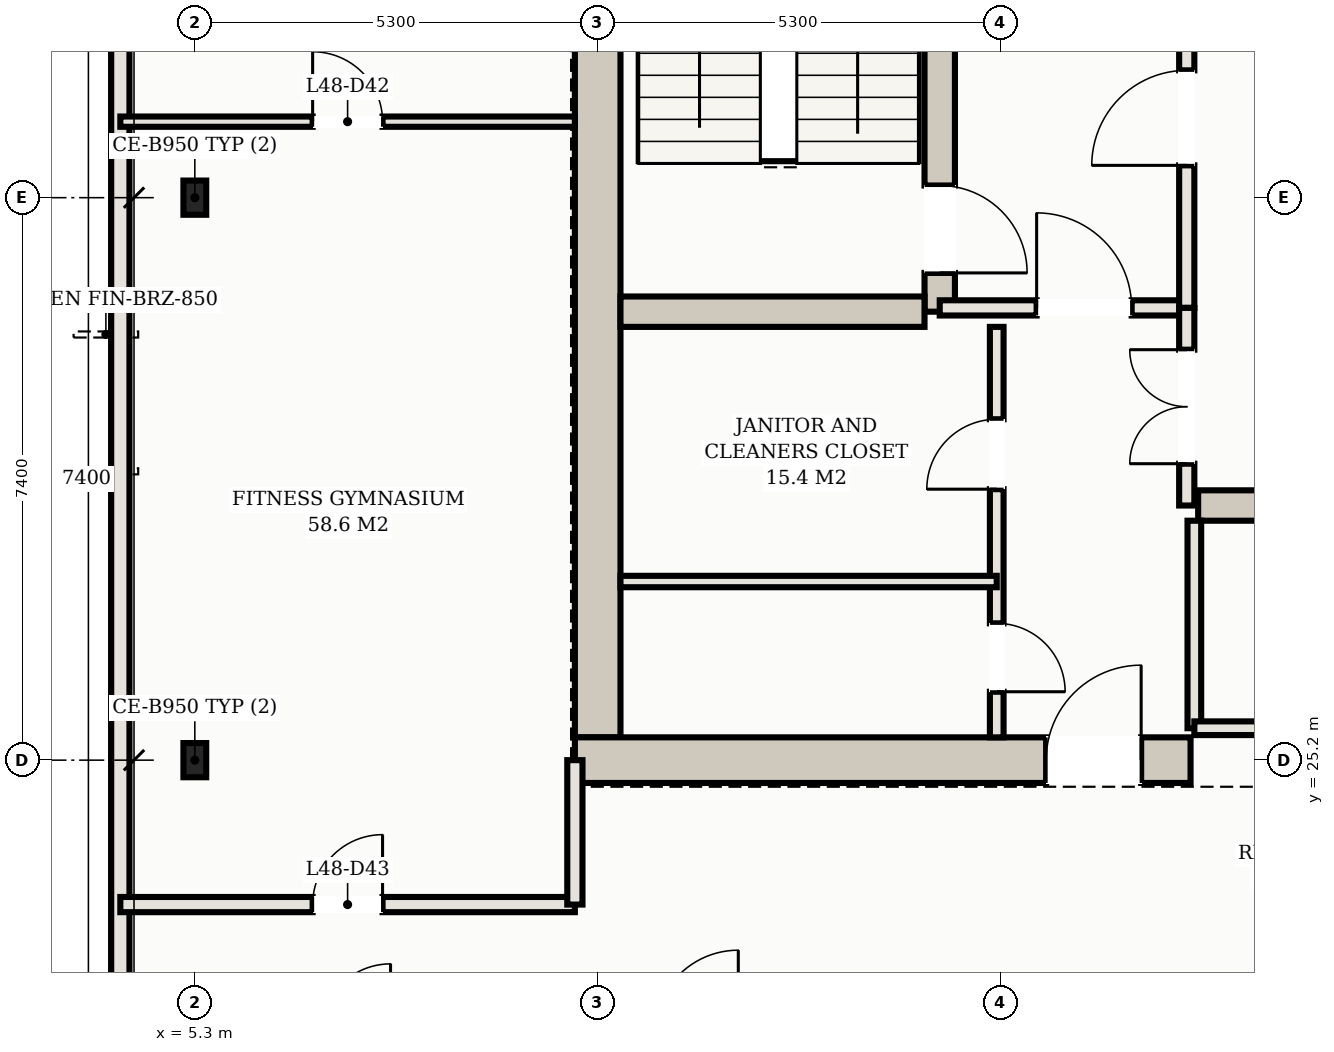
"""IFC4 building model, lengths in metres.
Left out: names, types, materials, properties, quantities, classifications, styles, units other than length and angle.
Written with IfcOpenShell. Run it as: python <this file> out.ifc"""

import sys

from ifc_helpers import new_model, si_unit, direction, frame, frame_2d, origin, origin_2d, place, context, subcontext, project, spatial, rectangle, hollow_rectangle, extrude, element, fill, save


model = new_model("IFC4")
c1 = context("Model", 3, precision=1e-05, world=origin(), true_north=direction((0.0, 1.0)))
c2 = subcontext(c1, "Body", "Model", "MODEL_VIEW")
j1 = project(units=[si_unit("LENGTHUNIT", "METRE"), si_unit("PLANEANGLEUNIT", "RADIAN")], contexts=[c1])
p1 = place(None, origin())
s1 = spatial("IfcSite", under=j1, at=p1, CompositionType="ELEMENT")
p2 = place(p1, origin())
s2 = spatial("IfcBuilding", under=s1, at=p2, CompositionType="ELEMENT")
p3 = place(p2, frame((0.0, 0.0, 175.5)))
s3 = spatial("IfcBuildingStorey", under=s2, at=p3, CompositionType="ELEMENT", Elevation=175.5)
p4 = place(p3, frame((10.6, 25.5, 0.0), z_axis=(0.0, 0.0, 1.0), x_axis=(0.0, 1.0, 0.0)))
e1 = element("IfcWall", 1, at=p4, inside=s3, PredefinedType="SHEAR", context=c2, shape_type="SweptSolid", body=[
    extrude(rectangle(XDim=14.2, YDim=0.6, at=frame_2d((7.1, 0.0))), origin(), (0.0, 0.0, 1.0), 3.1),
])
p5 = place(p3, frame((10.3, 25.2, 0.0), z_axis=(0.0, 0.0, 1.0), x_axis=(1.0, 0.0, 0.0)))
e2 = element("IfcWall", 2, at=p5, inside=s3, PredefinedType="SHEAR", context=c2, shape_type="SweptSolid", body=[
    extrude(rectangle(XDim=8.1, YDim=0.6, at=frame_2d((4.05, 0.0))), origin(), (0.0, 0.0, 1.0), 3.1),
])
p6 = place(p5, frame((6.2, 0.0, 0.0)))
e3 = element("IfcOpeningElement", 3, at=p6, cuts=e2, PredefinedType="OPENING", context=c2, shape_type="SweptSolid", body=[
    extrude(rectangle(XDim=1.25, YDim=2.2, at=frame_2d((0.625, 1.1))), frame((0.0, 0.31, 0.0), z_axis=(0.0, -1.0, 0.0), x_axis=(1.0, 0.0, 0.0)), (0.0, 0.0, 1.0), 0.62),
])
p7 = place(p3, frame((15.1, 31.1, 0.0), z_axis=(0.0, 0.0, 1.0), x_axis=(0.0, 1.0, 0.0)))
e4 = element("IfcWall", 4, at=p7, inside=s3, PredefinedType="SHEAR", context=c2, shape_type="SweptSolid", body=[
    extrude(rectangle(XDim=8.6, YDim=0.4, at=frame_2d((4.3, 0.0))), origin(), (0.0, 0.0, 1.0), 3.1),
])
p8 = place(p7, frame((0.51, 0.0, 0.0)))
e5 = element("IfcOpeningElement", 5, at=p8, cuts=e4, PredefinedType="OPENING", context=c2, shape_type="SweptSolid", body=[
    extrude(rectangle(XDim=1.15, YDim=2.2, at=frame_2d((0.575, 1.1))), frame((0.0, 0.21, 0.0), z_axis=(0.0, -1.0, 0.0), x_axis=(1.0, 0.0, 0.0)), (0.0, 0.0, 1.0), 0.42),
])
p9 = place(p3, frame((10.9, 31.1, 0.0), z_axis=(0.0, 0.0, 1.0), x_axis=(1.0, 0.0, 0.0)))
e6 = element("IfcWall", 6, at=p9, inside=s3, PredefinedType="SHEAR", context=c2, shape_type="SweptSolid", body=[
    extrude(rectangle(XDim=4.0, YDim=0.4, at=frame_2d((2.0, 0.0))), origin(), (0.0, 0.0, 1.0), 3.1),
])
p10 = place(p3, frame((18.5, 28.55, 0.0), z_axis=(0.0, 0.0, 1.0), x_axis=(1.0, 0.0, 0.0)))
e7 = element("IfcWall", 7, at=p10, inside=s3, PredefinedType="SHEAR", context=c2, shape_type="SweptSolid", body=[
    extrude(rectangle(XDim=16.0, YDim=0.4, at=frame_2d((8.0, 0.0))), origin(), (0.0, 0.0, 1.0), 3.1),
])
p11 = place(p10, frame((8.95, 0.0, 0.0)))
e8 = element("IfcOpeningElement", 8, at=p11, cuts=e7, PredefinedType="OPENING", context=c2, shape_type="SweptSolid", body=[
    extrude(rectangle(XDim=1.1, YDim=2.15, at=frame_2d((0.55, 1.075))), frame((0.0, 0.21, 0.0), z_axis=(0.0, -1.0, 0.0), x_axis=(1.0, 0.0, 0.0)), (0.0, 0.0, 1.0), 0.42),
])
p12 = place(p10, frame((11.55, 0.0, 0.0)))
e9 = element("IfcOpeningElement", 9, at=p12, cuts=e7, PredefinedType="OPENING", context=c2, shape_type="SweptSolid", body=[
    extrude(rectangle(XDim=1.1, YDim=2.15, at=frame_2d((0.55, 1.075))), frame((0.0, 0.21, 0.0), z_axis=(0.0, -1.0, 0.0), x_axis=(1.0, 0.0, 0.0)), (0.0, 0.0, 1.0), 0.42),
])
p13 = place(p10, frame((14.15, 0.0, 0.0)))
e10 = element("IfcOpeningElement", 10, at=p13, cuts=e7, PredefinedType="OPENING", context=c2, shape_type="SweptSolid", body=[
    extrude(rectangle(XDim=1.1, YDim=2.15, at=frame_2d((0.55, 1.075))), frame((0.0, 0.21, 0.0), z_axis=(0.0, -1.0, 0.0), x_axis=(1.0, 0.0, 0.0)), (0.0, 0.0, 1.0), 0.42),
])
for number, where, z_axis, x_axis in (
    (11, (5.3, 25.2, 0.0), (0.0, 0.0, 1.0), (1.0, 0.0, 0.0)),
    (12, (5.3, 32.6, 0.0), (0.0, 0.0, 1.0), (1.0, 0.0, 0.0)),
):
    element("IfcColumn", number, at=place(p3, frame(where, z_axis=z_axis, x_axis=x_axis)), inside=s3, PredefinedType="COLUMN", context=c2, shape_type="SweptSolid", body=[
        extrude(hollow_rectangle(XDim=0.3, YDim=0.45, WallThickness=0.016, at=origin_2d()), origin(), (0.0, 0.0, 1.0), 3.3),
    ])
p14 = place(p3, frame((4.32, 35.93, 0.0), z_axis=(0.0, 0.0, 1.0), x_axis=(0.0, -1.0, 0.0)))
e13 = element("IfcWall", 13, at=p14, inside=s3, PredefinedType="SOLIDWALL", context=c2, shape_type="SweptSolid", body=[
    extrude(rectangle(XDim=27.41, YDim=0.24, at=frame_2d((13.705, 0.0))), origin(), (0.0, 0.0, 1.0), 3.1),
])
p15 = place(p14, frame((17.13, 0.0, 0.0)))
e14 = element("IfcOpeningElement", 14, at=p15, cuts=e13, PredefinedType="OPENING", context=c2, shape_type="SweptSolid", body=[
    extrude(rectangle(XDim=1.8, YDim=2.2, at=frame_2d((0.9, 1.1))), frame((0.0, 0.13, 0.0), z_axis=(0.0, -1.0, 0.0), x_axis=(1.0, 0.0, 0.0)), (0.0, 0.0, 1.0), 0.26),
])
p16 = place(p3, frame((15.1, 31.15, 0.0), z_axis=(0.0, 0.0, 1.0), x_axis=(1.0, 0.0, 0.0)))
e15 = element("IfcWall", 15, at=p16, inside=s3, PredefinedType="PARTITIONING", context=c2, shape_type="SweptSolid", body=[
    extrude(rectangle(XDim=3.25, YDim=0.2, at=frame_2d((1.625, 0.0))), origin(), (0.0, 0.0, 1.0), 2.38),
])
p17 = place(p16, frame((1.275, 0.0, 0.0)))
e16 = element("IfcOpeningElement", 16, at=p17, cuts=e15, PredefinedType="OPENING", context=c2, shape_type="SweptSolid", body=[
    extrude(rectangle(XDim=1.25, YDim=2.2, at=frame_2d((0.625, 1.1))), frame((0.0, 0.11, 0.0), z_axis=(0.0, -1.0, 0.0), x_axis=(1.0, 0.0, 0.0)), (0.0, 0.0, 1.0), 0.22),
])
p18 = place(p3, frame((18.35, 31.15, 0.0), z_axis=(0.0, 0.0, 1.0), x_axis=(0.0, 1.0, 0.0)))
e17 = element("IfcWall", 17, at=p18, inside=s3, PredefinedType="PARTITIONING", context=c2, shape_type="SweptSolid", body=[
    extrude(rectangle(XDim=5.15, YDim=0.2, at=frame_2d((2.575, 0.0))), origin(), (0.0, 0.0, 1.0), 2.38),
])
p19 = place(p18, frame((1.875, 0.0, 0.0)))
e18 = element("IfcOpeningElement", 18, at=p19, cuts=e17, PredefinedType="OPENING", context=c2, shape_type="SweptSolid", body=[
    extrude(rectangle(XDim=1.25, YDim=2.2, at=frame_2d((0.625, 1.1))), frame((0.0, 0.11, 0.0), z_axis=(0.0, -1.0, 0.0), x_axis=(1.0, 0.0, 0.0)), (0.0, 0.0, 1.0), 0.22),
])
p20 = place(p3, frame((15.85, 25.5, 0.0), z_axis=(0.0, 0.0, 1.0), x_axis=(0.0, 1.0, 0.0)))
e19 = element("IfcWall", 19, at=p20, inside=s3, PredefinedType="PARTITIONING", context=c2, shape_type="SweptSolid", body=[
    extrude(rectangle(XDim=5.4, YDim=0.18, at=frame_2d((2.7, 0.0))), origin(), (0.0, 0.0, 1.0), 2.38),
])
p21 = place(p20, frame((0.6, 0.0, 0.0)))
e20 = element("IfcOpeningElement", 20, at=p21, cuts=e19, PredefinedType="OPENING", context=c2, shape_type="SweptSolid", body=[
    extrude(rectangle(XDim=0.9, YDim=2.15, at=frame_2d((0.45, 1.075))), frame((0.0, 0.1, 0.0), z_axis=(0.0, -1.0, 0.0), x_axis=(1.0, 0.0, 0.0)), (0.0, 0.0, 1.0), 0.2),
])
p22 = place(p20, frame((3.265, 0.0, 0.0)))
e21 = element("IfcOpeningElement", 21, at=p22, cuts=e19, PredefinedType="OPENING", context=c2, shape_type="SweptSolid", body=[
    extrude(rectangle(XDim=0.92, YDim=2.15, at=frame_2d((0.46, 1.075))), frame((0.0, 0.1, 0.0), z_axis=(0.0, -1.0, 0.0), x_axis=(1.0, 0.0, 0.0)), (0.0, 0.0, 1.0), 0.2),
])
p23 = place(p3, frame((10.9, 27.55, 0.0), z_axis=(0.0, 0.0, 1.0), x_axis=(1.0, 0.0, 0.0)))
e22 = element("IfcWall", 22, at=p23, inside=s3, PredefinedType="PARTITIONING", context=c2, shape_type="SweptSolid", body=[
    extrude(rectangle(XDim=4.95, YDim=0.15, at=frame_2d((2.475, 0.0))), origin(), (0.0, 0.0, 1.0), 2.38),
])
p24 = place(p3, frame((18.35, 28.55, 0.0), z_axis=(0.0, 0.0, 1.0), x_axis=(0.0, 1.0, 0.0)))
e23 = element("IfcWall", 23, at=p24, inside=s3, PredefinedType="PARTITIONING", context=c2, shape_type="SweptSolid", body=[
    extrude(rectangle(XDim=2.6, YDim=0.2, at=frame_2d((1.3, 0.0))), origin(), (0.0, 0.0, 1.0), 2.38),
])
p25 = place(p24, frame((0.55, 0.0, 0.0)))
e24 = element("IfcOpeningElement", 24, at=p25, cuts=e23, PredefinedType="OPENING", context=c2, shape_type="SweptSolid", body=[
    extrude(rectangle(XDim=1.5, YDim=2.25, at=frame_2d((0.75, 1.125))), frame((0.0, 0.11, 0.0), z_axis=(0.0, -1.0, 0.0), x_axis=(1.0, 0.0, 0.0)), (0.0, 0.0, 1.0), 0.22),
])
p26 = place(p3, frame((18.45, 25.62, 0.0), z_axis=(0.0, 0.0, 1.0), x_axis=(0.0, 1.0, 0.0)))
e25 = element("IfcWall", 25, at=p26, inside=s3, PredefinedType="PARTITIONING", context=c2, shape_type="SweptSolid", body=[
    extrude(rectangle(XDim=2.73, YDim=0.18, at=frame_2d((1.365, 0.0))), origin(), (0.0, 0.0, 1.0), 2.38),
])
p27 = place(p3, frame((18.45, 25.62, 0.0), z_axis=(0.0, 0.0, 1.0), x_axis=(1.0, 0.0, 0.0)))
e26 = element("IfcWall", 26, at=p27, inside=s3, PredefinedType="PARTITIONING", context=c2, shape_type="SweptSolid", body=[
    extrude(rectangle(XDim=7.9, YDim=0.18, at=frame_2d((3.95, 0.0))), origin(), (0.0, 0.0, 1.0), 2.38),
])
p28 = place(p27, frame((3.34, 0.0, 0.0)))
e27 = element("IfcOpeningElement", 27, at=p28, cuts=e26, PredefinedType="OPENING", context=c2, shape_type="SweptSolid", body=[
    extrude(rectangle(XDim=0.92, YDim=2.15, at=frame_2d((0.46, 1.075))), frame((0.0, 0.1, 0.0), z_axis=(0.0, -1.0, 0.0), x_axis=(1.0, 0.0, 0.0)), (0.0, 0.0, 1.0), 0.2),
])
p29 = place(p3, frame((4.32, 23.3, 0.0), z_axis=(0.0, 0.0, 1.0), x_axis=(1.0, 0.0, 0.0)))
e28 = element("IfcWall", 28, at=p29, inside=s3, PredefinedType="PARTITIONING", context=c2, shape_type="SweptSolid", body=[
    extrude(rectangle(XDim=5.98, YDim=0.2, at=frame_2d((2.99, 0.0))), origin(), (0.0, 0.0, 1.0), 2.38),
])
p30 = place(p29, frame((2.53, 0.0, 0.0)))
e29 = element("IfcOpeningElement", 29, at=p30, cuts=e28, PredefinedType="OPENING", context=c2, shape_type="SweptSolid", body=[
    extrude(rectangle(XDim=0.92, YDim=2.15, at=frame_2d((0.46, 1.075))), frame((0.0, 0.11, 0.0), z_axis=(0.0, -1.0, 0.0), x_axis=(1.0, 0.0, 0.0)), (0.0, 0.0, 1.0), 0.22),
])
p31 = place(p3, frame((10.3, 23.3, 0.0), z_axis=(0.0, 0.0, 1.0), x_axis=(0.0, 1.0, 0.0)))
e30 = element("IfcWall", 30, at=p31, inside=s3, PredefinedType="PARTITIONING", context=c2, shape_type="SweptSolid", body=[
    extrude(rectangle(XDim=1.9, YDim=0.2, at=frame_2d((0.95, 0.0))), origin(), (0.0, 0.0, 1.0), 2.38),
])
p32 = place(p3, frame((4.32, 33.6, 0.0), z_axis=(0.0, 0.0, 1.0), x_axis=(1.0, 0.0, 0.0)))
e31 = element("IfcWall", 31, at=p32, inside=s3, PredefinedType="PARTITIONING", context=c2, shape_type="SweptSolid", body=[
    extrude(rectangle(XDim=5.98, YDim=0.135, at=frame_2d((2.99, 0.0))), origin(), (0.0, 0.0, 1.0), 2.38),
])
p33 = place(p32, frame((2.53, 0.0, 0.0)))
e32 = element("IfcOpeningElement", 32, at=p33, cuts=e31, PredefinedType="OPENING", context=c2, shape_type="SweptSolid", body=[
    extrude(rectangle(XDim=0.92, YDim=2.15, at=frame_2d((0.46, 1.075))), frame((0.0, 0.078, 0.0), z_axis=(0.0, -1.0, 0.0), x_axis=(1.0, 0.0, 0.0)), (0.0, 0.0, 1.0), 0.155),
])
p34 = place(p6, origin())
e33 = element("IfcDoor", 33, at=p34, inside=s3, OperationType="SINGLE_SWING_RIGHT", PredefinedType="DOOR", context=c2, shape_type="SweptSolid", body=[
    extrude(rectangle(XDim=1.25, YDim=2.2, at=frame_2d((0.625, 1.1))), frame((0.0, 0.025, 0.0), z_axis=(0.0, -1.0, 0.0), x_axis=(1.0, 0.0, 0.0)), (0.0, 0.0, 1.0), 0.05),
])
fill(e3, e33)
p35 = place(p17, origin())
e34 = element("IfcDoor", 34, at=p35, inside=s3, OperationType="SINGLE_SWING_LEFT", PredefinedType="DOOR", context=c2, shape_type="SweptSolid", body=[
    extrude(rectangle(XDim=1.25, YDim=2.2, at=frame_2d((0.625, 1.1))), frame((0.0, 0.025, 0.0), z_axis=(0.0, -1.0, 0.0), x_axis=(1.0, 0.0, 0.0)), (0.0, 0.0, 1.0), 0.05),
])
fill(e16, e34)
p36 = place(p19, origin())
e35 = element("IfcDoor", 35, at=p36, inside=s3, OperationType="SINGLE_SWING_LEFT", PredefinedType="DOOR", context=c2, shape_type="SweptSolid", body=[
    extrude(rectangle(XDim=1.25, YDim=2.2, at=frame_2d((0.625, 1.1))), frame((0.0, 0.025, 0.0), z_axis=(0.0, -1.0, 0.0), x_axis=(1.0, 0.0, 0.0)), (0.0, 0.0, 1.0), 0.05),
])
fill(e18, e35)
p37 = place(p8, frame((1.15, 0.0, 0.0), z_axis=(0.0, 0.0, 1.0), x_axis=(-1.0, 0.0, 0.0)))
e36 = element("IfcDoor", 36, at=p37, inside=s3, OperationType="SINGLE_SWING_RIGHT", PredefinedType="DOOR", context=c2, shape_type="SweptSolid", body=[
    extrude(rectangle(XDim=1.15, YDim=2.2, at=frame_2d((0.575, 1.1))), frame((0.0, 0.025, 0.0), z_axis=(0.0, -1.0, 0.0), x_axis=(1.0, 0.0, 0.0)), (0.0, 0.0, 1.0), 0.05),
])
fill(e5, e36)
p38 = place(p21, frame((0.9, 0.0, 0.0), z_axis=(0.0, 0.0, 1.0), x_axis=(-1.0, 0.0, 0.0)))
e37 = element("IfcDoor", 37, at=p38, inside=s3, OperationType="SINGLE_SWING_RIGHT", PredefinedType="DOOR", context=c2, shape_type="SweptSolid", body=[
    extrude(rectangle(XDim=0.9, YDim=2.15, at=frame_2d((0.45, 1.075))), frame((0.0, 0.025, 0.0), z_axis=(0.0, -1.0, 0.0), x_axis=(1.0, 0.0, 0.0)), (0.0, 0.0, 1.0), 0.05),
])
fill(e20, e37)
p39 = place(p22, origin())
e38 = element("IfcDoor", 38, at=p39, inside=s3, OperationType="SINGLE_SWING_LEFT", PredefinedType="DOOR", context=c2, shape_type="SweptSolid", body=[
    extrude(rectangle(XDim=0.92, YDim=2.15, at=frame_2d((0.46, 1.075))), frame((0.0, 0.025, 0.0), z_axis=(0.0, -1.0, 0.0), x_axis=(1.0, 0.0, 0.0)), (0.0, 0.0, 1.0), 0.05),
])
fill(e21, e38)
p40 = place(p25, origin())
e39 = element("IfcDoor", 39, at=p40, inside=s3, OperationType="DOUBLE_DOOR_SINGLE_SWING", PredefinedType="DOOR", context=c2, shape_type="SweptSolid", body=[
    extrude(rectangle(XDim=1.5, YDim=2.25, at=frame_2d((0.75, 1.125))), frame((0.0, 0.025, 0.0), z_axis=(0.0, -1.0, 0.0), x_axis=(1.0, 0.0, 0.0)), (0.0, 0.0, 1.0), 0.05),
])
fill(e24, e39)
p41 = place(p33, origin())
e40 = element("IfcDoor", 40, at=p41, inside=s3, OperationType="SINGLE_SWING_LEFT", PredefinedType="DOOR", context=c2, shape_type="SweptSolid", body=[
    extrude(rectangle(XDim=0.92, YDim=2.15, at=frame_2d((0.46, 1.075))), frame((0.0, 0.025, 0.0), z_axis=(0.0, -1.0, 0.0), x_axis=(1.0, 0.0, 0.0)), (0.0, 0.0, 1.0), 0.05),
])
fill(e32, e40)
p42 = place(p30, origin())
e41 = element("IfcDoor", 41, at=p42, inside=s3, OperationType="SINGLE_SWING_RIGHT", PredefinedType="DOOR", context=c2, shape_type="SweptSolid", body=[
    extrude(rectangle(XDim=0.92, YDim=2.15, at=frame_2d((0.46, 1.075))), frame((0.0, 0.025, 0.0), z_axis=(0.0, -1.0, 0.0), x_axis=(1.0, 0.0, 0.0)), (0.0, 0.0, 1.0), 0.05),
])
fill(e29, e41)
save(model, sys.argv[1])
